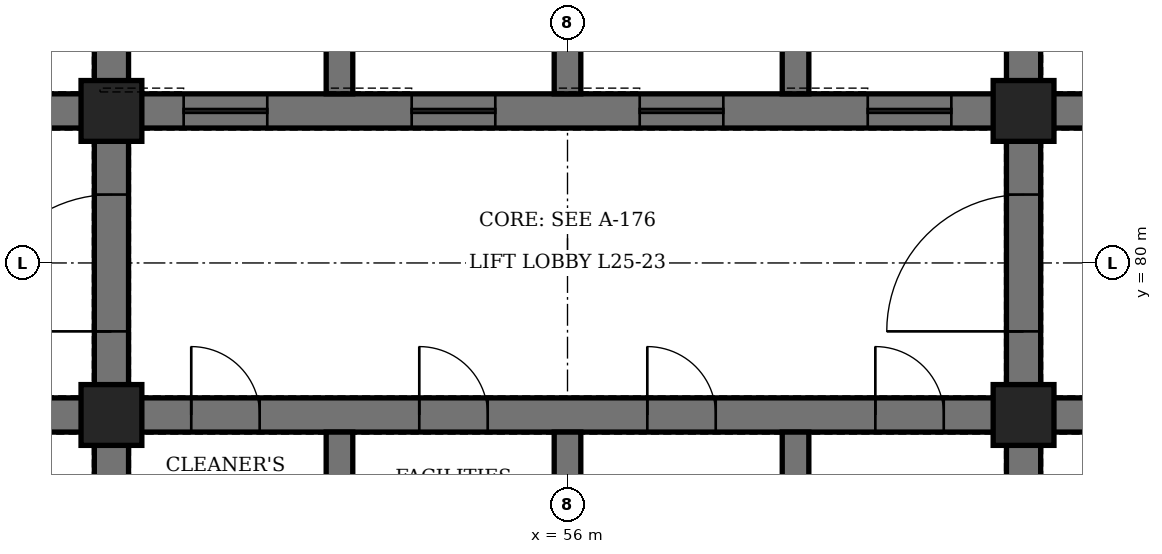
"""IFC4 building model, lengths in metres.
Left out: names, types, materials, properties, quantities, classifications, styles, units other than length and angle.
Written with IfcOpenShell. Run it as: python <this file> out.ifc"""

import sys

from ifc_helpers import new_model, si_unit, direction, frame, frame_2d, origin, origin_2d, place, context, subcontext, project, spatial, rectangle, hollow_rectangle, extrude, element, fill, save


model = new_model("IFC4")
c1 = context("Model", 3, precision=1e-05, world=origin(), true_north=direction((0.0, 1.0)))
c2 = subcontext(c1, "Body", "Model", "MODEL_VIEW")
j1 = project(units=[si_unit("LENGTHUNIT", "METRE"), si_unit("PLANEANGLEUNIT", "RADIAN")], contexts=[c1])
p1 = place(None, origin())
s1 = spatial("IfcSite", under=j1, at=p1, CompositionType="ELEMENT")
p2 = place(p1, origin())
s2 = spatial("IfcBuilding", under=s1, at=p2, CompositionType="ELEMENT")
p3 = place(p2, frame((0.0, 0.0, 116.5)))
s3 = spatial("IfcBuildingStorey", under=s2, at=p3, CompositionType="ELEMENT", Elevation=116.5)
p4 = place(p3, frame((50.0, 71.6, 0.0), z_axis=(0.0, 0.0, 1.0), x_axis=(0.0, 1.0, 0.0)))
e1 = element("IfcWall", 1, at=p4, inside=s3, PredefinedType="SHEAR", context=c2, shape_type="SweptSolid", body=[
    extrude(rectangle(XDim=16.8, YDim=0.45, at=frame_2d((8.4, 0.0))), origin(), (0.0, 0.0, 1.0), 4.2),
])
p5 = place(p4, frame((7.5, 0.0, 0.0)))
e2 = element("IfcOpeningElement", 2, at=p5, cuts=e1, PredefinedType="OPENING", context=c2, shape_type="SweptSolid", body=[
    extrude(rectangle(XDim=1.8, YDim=2.4, at=frame_2d((0.9, 1.2))), frame((0.0, 0.235, 0.0), z_axis=(0.0, -1.0, 0.0), x_axis=(1.0, 0.0, 0.0)), (0.0, 0.0, 1.0), 0.47),
])
p6 = place(p3, frame((62.0, 71.6, 0.0), z_axis=(0.0, 0.0, 1.0), x_axis=(0.0, 1.0, 0.0)))
e3 = element("IfcWall", 3, at=p6, inside=s3, PredefinedType="SHEAR", context=c2, shape_type="SweptSolid", body=[
    extrude(rectangle(XDim=16.8, YDim=0.45, at=frame_2d((8.4, 0.0))), origin(), (0.0, 0.0, 1.0), 4.2),
])
p7 = place(p6, frame((7.5, 0.0, 0.0)))
e4 = element("IfcOpeningElement", 4, at=p7, cuts=e3, PredefinedType="OPENING", context=c2, shape_type="SweptSolid", body=[
    extrude(rectangle(XDim=1.8, YDim=2.4, at=frame_2d((0.9, 1.2))), frame((0.0, 0.235, 0.0), z_axis=(0.0, -1.0, 0.0), x_axis=(1.0, 0.0, 0.0)), (0.0, 0.0, 1.0), 0.47),
])
p8 = place(p3, frame((44.6, 78.0, 0.0), z_axis=(0.0, 0.0, 1.0), x_axis=(1.0, 0.0, 0.0)))
e5 = element("IfcWall", 5, at=p8, inside=s3, PredefinedType="SHEAR", context=c2, shape_type="SweptSolid", body=[
    extrude(rectangle(XDim=5.175, YDim=0.45, at=frame_2d((2.587, 0.0))), origin(), (0.0, 0.0, 1.0), 4.2),
])
p9 = place(p8, frame((1.8, 0.0, 0.0)))
e6 = element("IfcOpeningElement", 6, at=p9, cuts=e5, PredefinedType="OPENING", context=c2, shape_type="SweptSolid", body=[
    extrude(rectangle(XDim=1.2, YDim=2.1, at=frame_2d((0.6, 1.05))), frame((0.0, 0.235, 0.0), z_axis=(0.0, -1.0, 0.0), x_axis=(1.0, 0.0, 0.0)), (0.0, 0.0, 1.0), 0.47),
])
p10 = place(p3, frame((44.6, 82.0, 0.0), z_axis=(0.0, 0.0, 1.0), x_axis=(1.0, 0.0, 0.0)))
e7 = element("IfcWall", 7, at=p10, inside=s3, PredefinedType="SHEAR", context=c2, shape_type="SweptSolid", body=[
    extrude(rectangle(XDim=5.175, YDim=0.45, at=frame_2d((2.587, 0.0))), origin(), (0.0, 0.0, 1.0), 4.2),
])
p11 = place(p10, frame((0.7, 0.0, 0.0)))
e8 = element("IfcOpeningElement", 8, at=p11, cuts=e7, PredefinedType="OPENING", context=c2, shape_type="SweptSolid", body=[
    extrude(rectangle(XDim=0.9, YDim=2.1, at=frame_2d((0.45, 1.05))), frame((0.0, 0.235, 0.0), z_axis=(0.0, -1.0, 0.0), x_axis=(1.0, 0.0, 0.0)), (0.0, 0.0, 1.0), 0.47),
])
p12 = place(p3, frame((62.225, 78.0, 0.0), z_axis=(0.0, 0.0, 1.0), x_axis=(1.0, 0.0, 0.0)))
e9 = element("IfcWall", 9, at=p12, inside=s3, PredefinedType="SHEAR", context=c2, shape_type="SweptSolid", body=[
    extrude(rectangle(XDim=5.175, YDim=0.45, at=frame_2d((2.587, 0.0))), origin(), (0.0, 0.0, 1.0), 4.2),
])
p13 = place(p12, frame((2.175, 0.0, 0.0)))
e10 = element("IfcOpeningElement", 10, at=p13, cuts=e9, PredefinedType="OPENING", context=c2, shape_type="SweptSolid", body=[
    extrude(rectangle(XDim=1.2, YDim=2.1, at=frame_2d((0.6, 1.05))), frame((0.0, 0.235, 0.0), z_axis=(0.0, -1.0, 0.0), x_axis=(1.0, 0.0, 0.0)), (0.0, 0.0, 1.0), 0.47),
])
p14 = place(p3, frame((62.225, 82.0, 0.0), z_axis=(0.0, 0.0, 1.0), x_axis=(1.0, 0.0, 0.0)))
e11 = element("IfcWall", 11, at=p14, inside=s3, PredefinedType="SHEAR", context=c2, shape_type="SweptSolid", body=[
    extrude(rectangle(XDim=5.175, YDim=0.45, at=frame_2d((2.587, 0.0))), origin(), (0.0, 0.0, 1.0), 4.2),
])
p15 = place(p14, frame((2.175, 0.0, 0.0)))
e12 = element("IfcOpeningElement", 12, at=p15, cuts=e11, PredefinedType="OPENING", context=c2, shape_type="SweptSolid", body=[
    extrude(rectangle(XDim=1.2, YDim=2.1, at=frame_2d((0.6, 1.05))), frame((0.0, 0.235, 0.0), z_axis=(0.0, -1.0, 0.0), x_axis=(1.0, 0.0, 0.0)), (0.0, 0.0, 1.0), 0.47),
])
p16 = place(p3, frame((50.225, 78.0, 0.0), z_axis=(0.0, 0.0, 1.0), x_axis=(1.0, 0.0, 0.0)))
e13 = element("IfcWall", 13, at=p16, inside=s3, PredefinedType="SHEAR", context=c2, shape_type="SweptSolid", body=[
    extrude(rectangle(XDim=11.55, YDim=0.45, at=frame_2d((5.775, 0.0))), origin(), (0.0, 0.0, 1.0), 4.2),
])
p17 = place(p16, frame((0.825, 0.0, 0.0)))
e14 = element("IfcOpeningElement", 14, at=p17, cuts=e13, PredefinedType="OPENING", context=c2, shape_type="SweptSolid", body=[
    extrude(rectangle(XDim=0.9, YDim=2.1, at=frame_2d((0.45, 1.05))), frame((0.0, 0.235, 0.0), z_axis=(0.0, -1.0, 0.0), x_axis=(1.0, 0.0, 0.0)), (0.0, 0.0, 1.0), 0.47),
])
p18 = place(p16, frame((3.825, 0.0, 0.0)))
e15 = element("IfcOpeningElement", 15, at=p18, cuts=e13, PredefinedType="OPENING", context=c2, shape_type="SweptSolid", body=[
    extrude(rectangle(XDim=0.9, YDim=2.1, at=frame_2d((0.45, 1.05))), frame((0.0, 0.235, 0.0), z_axis=(0.0, -1.0, 0.0), x_axis=(1.0, 0.0, 0.0)), (0.0, 0.0, 1.0), 0.47),
])
p19 = place(p16, frame((6.825, 0.0, 0.0)))
e16 = element("IfcOpeningElement", 16, at=p19, cuts=e13, PredefinedType="OPENING", context=c2, shape_type="SweptSolid", body=[
    extrude(rectangle(XDim=0.9, YDim=2.1, at=frame_2d((0.45, 1.05))), frame((0.0, 0.235, 0.0), z_axis=(0.0, -1.0, 0.0), x_axis=(1.0, 0.0, 0.0)), (0.0, 0.0, 1.0), 0.47),
])
p20 = place(p16, frame((9.825, 0.0, 0.0)))
e17 = element("IfcOpeningElement", 17, at=p20, cuts=e13, PredefinedType="OPENING", context=c2, shape_type="SweptSolid", body=[
    extrude(rectangle(XDim=0.9, YDim=2.1, at=frame_2d((0.45, 1.05))), frame((0.0, 0.235, 0.0), z_axis=(0.0, -1.0, 0.0), x_axis=(1.0, 0.0, 0.0)), (0.0, 0.0, 1.0), 0.47),
])
p21 = place(p3, frame((50.225, 82.0, 0.0), z_axis=(0.0, 0.0, 1.0), x_axis=(1.0, 0.0, 0.0)))
e18 = element("IfcWall", 18, at=p21, inside=s3, PredefinedType="SHEAR", context=c2, shape_type="SweptSolid", body=[
    extrude(rectangle(XDim=11.55, YDim=0.45, at=frame_2d((5.775, 0.0))), origin(), (0.0, 0.0, 1.0), 4.2),
])
p22 = place(p21, frame((0.725, 0.0, 0.0)))
e19 = element("IfcOpeningElement", 19, at=p22, cuts=e18, PredefinedType="OPENING", context=c2, shape_type="SweptSolid", body=[
    extrude(rectangle(XDim=1.1, YDim=2.2, at=frame_2d((0.55, 1.1))), frame((0.0, 0.235, 0.0), z_axis=(0.0, -1.0, 0.0), x_axis=(1.0, 0.0, 0.0)), (0.0, 0.0, 1.0), 0.47),
])
p23 = place(p21, frame((3.725, 0.0, 0.0)))
e20 = element("IfcOpeningElement", 20, at=p23, cuts=e18, PredefinedType="OPENING", context=c2, shape_type="SweptSolid", body=[
    extrude(rectangle(XDim=1.1, YDim=2.2, at=frame_2d((0.55, 1.1))), frame((0.0, 0.235, 0.0), z_axis=(0.0, -1.0, 0.0), x_axis=(1.0, 0.0, 0.0)), (0.0, 0.0, 1.0), 0.47),
])
p24 = place(p21, frame((6.725, 0.0, 0.0)))
e21 = element("IfcOpeningElement", 21, at=p24, cuts=e18, PredefinedType="OPENING", context=c2, shape_type="SweptSolid", body=[
    extrude(rectangle(XDim=1.1, YDim=2.2, at=frame_2d((0.55, 1.1))), frame((0.0, 0.235, 0.0), z_axis=(0.0, -1.0, 0.0), x_axis=(1.0, 0.0, 0.0)), (0.0, 0.0, 1.0), 0.47),
])
p25 = place(p21, frame((9.725, 0.0, 0.0)))
e22 = element("IfcOpeningElement", 22, at=p25, cuts=e18, PredefinedType="OPENING", context=c2, shape_type="SweptSolid", body=[
    extrude(rectangle(XDim=1.1, YDim=2.2, at=frame_2d((0.55, 1.1))), frame((0.0, 0.235, 0.0), z_axis=(0.0, -1.0, 0.0), x_axis=(1.0, 0.0, 0.0)), (0.0, 0.0, 1.0), 0.47),
])
p26 = place(p3, frame((53.0, 74.175, 0.0), z_axis=(0.0, 0.0, 1.0), x_axis=(0.0, 1.0, 0.0)))
e23 = element("IfcWall", 23, at=p26, inside=s3, PredefinedType="SHEAR", context=c2, shape_type="SweptSolid", body=[
    extrude(rectangle(XDim=3.6, YDim=0.35, at=frame_2d((1.8, 0.0))), origin(), (0.0, 0.0, 1.0), 4.2),
])
p27 = place(p3, frame((53.0, 82.225, 0.0), z_axis=(0.0, 0.0, 1.0), x_axis=(0.0, 1.0, 0.0)))
e24 = element("IfcWall", 24, at=p27, inside=s3, PredefinedType="SHEAR", context=c2, shape_type="SweptSolid", body=[
    extrude(rectangle(XDim=3.55, YDim=0.35, at=frame_2d((1.775, 0.0))), origin(), (0.0, 0.0, 1.0), 4.2),
])
p28 = place(p3, frame((56.0, 74.175, 0.0), z_axis=(0.0, 0.0, 1.0), x_axis=(0.0, 1.0, 0.0)))
e25 = element("IfcWall", 25, at=p28, inside=s3, PredefinedType="SHEAR", context=c2, shape_type="SweptSolid", body=[
    extrude(rectangle(XDim=3.6, YDim=0.35, at=frame_2d((1.8, 0.0))), origin(), (0.0, 0.0, 1.0), 4.2),
])
p29 = place(p3, frame((56.0, 82.225, 0.0), z_axis=(0.0, 0.0, 1.0), x_axis=(0.0, 1.0, 0.0)))
e26 = element("IfcWall", 26, at=p29, inside=s3, PredefinedType="SHEAR", context=c2, shape_type="SweptSolid", body=[
    extrude(rectangle(XDim=3.55, YDim=0.35, at=frame_2d((1.775, 0.0))), origin(), (0.0, 0.0, 1.0), 4.2),
])
p30 = place(p3, frame((59.0, 74.175, 0.0), z_axis=(0.0, 0.0, 1.0), x_axis=(0.0, 1.0, 0.0)))
e27 = element("IfcWall", 27, at=p30, inside=s3, PredefinedType="SHEAR", context=c2, shape_type="SweptSolid", body=[
    extrude(rectangle(XDim=3.6, YDim=0.35, at=frame_2d((1.8, 0.0))), origin(), (0.0, 0.0, 1.0), 4.2),
])
p31 = place(p3, frame((59.0, 82.225, 0.0), z_axis=(0.0, 0.0, 1.0), x_axis=(0.0, 1.0, 0.0)))
e28 = element("IfcWall", 28, at=p31, inside=s3, PredefinedType="SHEAR", context=c2, shape_type="SweptSolid", body=[
    extrude(rectangle(XDim=3.55, YDim=0.35, at=frame_2d((1.775, 0.0))), origin(), (0.0, 0.0, 1.0), 4.2),
])
for number, where, z_axis, x_axis in (
    (29, (50.0, 78.0, 0.0), (0.0, 0.0, 1.0), (1.0, 0.0, 0.0)),
    (30, (50.0, 82.0, 0.0), (0.0, 0.0, 1.0), (1.0, 0.0, 0.0)),
    (31, (62.0, 78.0, 0.0), (0.0, 0.0, 1.0), (1.0, 0.0, 0.0)),
    (32, (62.0, 82.0, 0.0), (0.0, 0.0, 1.0), (1.0, 0.0, 0.0)),
):
    element("IfcColumn", number, at=place(p3, frame(where, z_axis=z_axis, x_axis=x_axis)), inside=s3, PredefinedType="COLUMN", context=c2, shape_type="SweptSolid", body=[
        extrude(hollow_rectangle(XDim=0.8, YDim=0.8, WallThickness=0.1, at=origin_2d()), origin(), (0.0, 0.0, 1.0), 4.2),
    ])
p32 = place(p17, origin())
e33 = element("IfcDoor", 33, at=p32, inside=s3, OperationType="SINGLE_SWING_LEFT", PredefinedType="DOOR", context=c2, shape_type="SweptSolid", body=[
    extrude(rectangle(XDim=0.9, YDim=2.1, at=frame_2d((0.45, 1.05))), frame((0.0, 0.225, 0.0), z_axis=(0.0, -1.0, 0.0), x_axis=(1.0, 0.0, 0.0)), (0.0, 0.0, 1.0), 0.449),
])
fill(e14, e33)
p33 = place(p18, origin())
e34 = element("IfcDoor", 34, at=p33, inside=s3, OperationType="SINGLE_SWING_LEFT", PredefinedType="DOOR", context=c2, shape_type="SweptSolid", body=[
    extrude(rectangle(XDim=0.9, YDim=2.1, at=frame_2d((0.45, 1.05))), frame((0.0, 0.225, 0.0), z_axis=(0.0, -1.0, 0.0), x_axis=(1.0, 0.0, 0.0)), (0.0, 0.0, 1.0), 0.449),
])
fill(e15, e34)
p34 = place(p19, origin())
e35 = element("IfcDoor", 35, at=p34, inside=s3, OperationType="SINGLE_SWING_LEFT", PredefinedType="DOOR", context=c2, shape_type="SweptSolid", body=[
    extrude(rectangle(XDim=0.9, YDim=2.1, at=frame_2d((0.45, 1.05))), frame((0.0, 0.225, 0.0), z_axis=(0.0, -1.0, 0.0), x_axis=(1.0, 0.0, 0.0)), (0.0, 0.0, 1.0), 0.449),
])
fill(e16, e35)
p35 = place(p20, origin())
e36 = element("IfcDoor", 36, at=p35, inside=s3, OperationType="SINGLE_SWING_LEFT", PredefinedType="DOOR", context=c2, shape_type="SweptSolid", body=[
    extrude(rectangle(XDim=0.9, YDim=2.1, at=frame_2d((0.45, 1.05))), frame((0.0, 0.225, 0.0), z_axis=(0.0, -1.0, 0.0), x_axis=(1.0, 0.0, 0.0)), (0.0, 0.0, 1.0), 0.449),
])
fill(e17, e36)
p36 = place(p5, origin())
e37 = element("IfcDoor", 37, at=p36, inside=s3, OperationType="DOUBLE_DOOR_SINGLE_SWING", PredefinedType="DOOR", context=c2, shape_type="SweptSolid", body=[
    extrude(rectangle(XDim=1.8, YDim=2.4, at=frame_2d((0.9, 1.2))), frame((0.0, 0.225, 0.0), z_axis=(0.0, -1.0, 0.0), x_axis=(1.0, 0.0, 0.0)), (0.0, 0.0, 1.0), 0.449),
])
fill(e2, e37)
p37 = place(p7, origin())
e38 = element("IfcDoor", 38, at=p37, inside=s3, OperationType="DOUBLE_DOOR_SINGLE_SWING", PredefinedType="DOOR", context=c2, shape_type="SweptSolid", body=[
    extrude(rectangle(XDim=1.8, YDim=2.4, at=frame_2d((0.9, 1.2))), frame((0.0, 0.225, 0.0), z_axis=(0.0, -1.0, 0.0), x_axis=(1.0, 0.0, 0.0)), (0.0, 0.0, 1.0), 0.449),
])
fill(e4, e38)
p38 = place(p22, origin())
e39 = element("IfcDoor", 39, at=p38, inside=s3, OperationType="SLIDING_TO_LEFT", PredefinedType="DOOR", context=c2, shape_type="SweptSolid", body=[
    extrude(rectangle(XDim=1.1, YDim=2.2, at=frame_2d((0.55, 1.1))), frame((0.0, 0.225, 0.0), z_axis=(0.0, -1.0, 0.0), x_axis=(1.0, 0.0, 0.0)), (0.0, 0.0, 1.0), 0.449),
])
fill(e19, e39)
p39 = place(p23, origin())
e40 = element("IfcDoor", 40, at=p39, inside=s3, OperationType="SLIDING_TO_LEFT", PredefinedType="DOOR", context=c2, shape_type="SweptSolid", body=[
    extrude(rectangle(XDim=1.1, YDim=2.2, at=frame_2d((0.55, 1.1))), frame((0.0, 0.225, 0.0), z_axis=(0.0, -1.0, 0.0), x_axis=(1.0, 0.0, 0.0)), (0.0, 0.0, 1.0), 0.449),
])
fill(e20, e40)
p40 = place(p24, origin())
e41 = element("IfcDoor", 41, at=p40, inside=s3, OperationType="SLIDING_TO_LEFT", PredefinedType="DOOR", context=c2, shape_type="SweptSolid", body=[
    extrude(rectangle(XDim=1.1, YDim=2.2, at=frame_2d((0.55, 1.1))), frame((0.0, 0.225, 0.0), z_axis=(0.0, -1.0, 0.0), x_axis=(1.0, 0.0, 0.0)), (0.0, 0.0, 1.0), 0.449),
])
fill(e21, e41)
p41 = place(p25, origin())
e42 = element("IfcDoor", 42, at=p41, inside=s3, OperationType="SLIDING_TO_LEFT", PredefinedType="DOOR", context=c2, shape_type="SweptSolid", body=[
    extrude(rectangle(XDim=1.1, YDim=2.2, at=frame_2d((0.55, 1.1))), frame((0.0, 0.225, 0.0), z_axis=(0.0, -1.0, 0.0), x_axis=(1.0, 0.0, 0.0)), (0.0, 0.0, 1.0), 0.449),
])
fill(e22, e42)
save(model, sys.argv[1])
